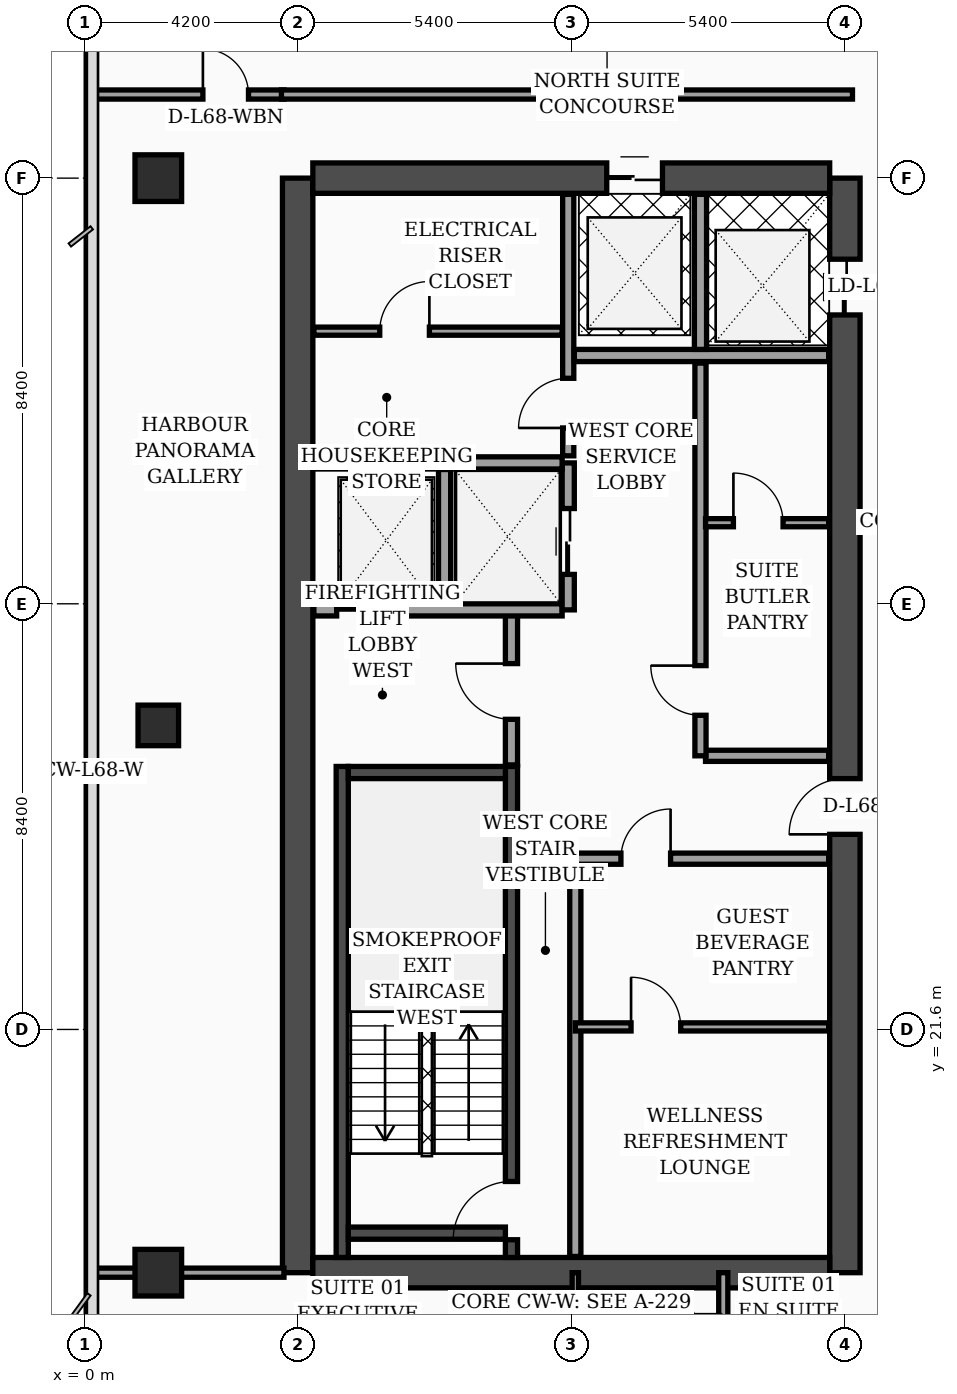
"""IFC4 building model, lengths in metres.
Left out: names, types, materials, properties, quantities, classifications, styles, units other than length and angle.
Written with IfcOpenShell. Run it as: python <this file> out.ifc"""

import sys

from ifc_helpers import new_model, si_unit, direction, frame, frame_2d, origin, origin_2d, place, context, subcontext, project, spatial, rectangle, extrude, element, fill, save


model = new_model("IFC4")
c1 = context("Model", 3, precision=1e-05, world=origin(), true_north=direction((0.0, 1.0)))
c2 = subcontext(c1, "Body", "Model", "MODEL_VIEW")
j1 = project(units=[si_unit("LENGTHUNIT", "METRE"), si_unit("PLANEANGLEUNIT", "RADIAN")], contexts=[c1])
p1 = place(None, origin())
s1 = spatial("IfcSite", under=j1, at=p1, CompositionType="ELEMENT")
p2 = place(p1, origin())
s2 = spatial("IfcBuilding", under=s1, at=p2, CompositionType="ELEMENT")
p3 = place(p2, frame((0.0, 0.0, 274.9)))
s3 = spatial("IfcBuildingStorey", under=s2, at=p3, CompositionType="ELEMENT", Elevation=274.9)
p4 = place(p3, frame((4.2, 16.8, 0.0), z_axis=(0.0, 0.0, 1.0), x_axis=(0.0, 1.0, 0.0)))
e1 = element("IfcWall", 1, at=p4, inside=s3, PredefinedType="SHEAR", context=c2, shape_type="SweptSolid", body=[
    extrude(rectangle(XDim=21.6, YDim=0.6, at=frame_2d((10.8, 0.0))), origin(), (0.0, 0.0, 1.0), 3.56),
])
p5 = place(p3, frame((15.0, 16.8, 0.0), z_axis=(0.0, 0.0, 1.0), x_axis=(0.0, 1.0, 0.0)))
e2 = element("IfcWall", 2, at=p5, inside=s3, PredefinedType="SHEAR", context=c2, shape_type="SweptSolid", body=[
    extrude(rectangle(XDim=21.6, YDim=0.6, at=frame_2d((10.8, 0.0))), origin(), (0.0, 0.0, 1.0), 3.56),
])
p6 = place(p5, frame((8.65, 0.0, 0.0)))
e3 = element("IfcOpeningElement", 3, at=p6, cuts=e2, PredefinedType="OPENING", context=c2, shape_type="SweptSolid", body=[
    extrude(rectangle(XDim=1.1, YDim=2.2, at=frame_2d((0.55, 1.1))), frame((0.0, 0.31, 0.0), z_axis=(0.0, -1.0, 0.0), x_axis=(1.0, 0.0, 0.0)), (0.0, 0.0, 1.0), 0.62),
])
p7 = place(p5, frame((18.9, 0.0, 0.0)))
e4 = element("IfcOpeningElement", 4, at=p7, cuts=e2, PredefinedType="OPENING", context=c2, shape_type="SweptSolid", body=[
    extrude(rectangle(XDim=1.1, YDim=2.2, at=frame_2d((0.55, 1.1))), frame((0.0, 0.31, 0.0), z_axis=(0.0, -1.0, 0.0), x_axis=(1.0, 0.0, 0.0)), (0.0, 0.0, 1.0), 0.62),
])
p8 = place(p3, frame((4.5, 38.4, 0.0), z_axis=(0.0, 0.0, 1.0), x_axis=(1.0, 0.0, 0.0)))
e5 = element("IfcWall", 5, at=p8, inside=s3, PredefinedType="SHEAR", context=c2, shape_type="SweptSolid", body=[
    extrude(rectangle(XDim=10.2, YDim=0.6, at=frame_2d((5.1, 0.0))), origin(), (0.0, 0.0, 1.0), 3.56),
])
p9 = place(p8, frame((5.8, 0.0, 0.0)))
e6 = element("IfcOpeningElement", 6, at=p9, cuts=e5, PredefinedType="OPENING", context=c2, shape_type="SweptSolid", body=[
    extrude(rectangle(XDim=1.1, YDim=2.2, at=frame_2d((0.55, 1.1))), frame((0.0, 0.31, 0.0), z_axis=(0.0, -1.0, 0.0), x_axis=(1.0, 0.0, 0.0)), (0.0, 0.0, 1.0), 0.62),
])
p10 = place(p3, frame((4.5, 16.8, 0.0), z_axis=(0.0, 0.0, 1.0), x_axis=(1.0, 0.0, 0.0)))
e7 = element("IfcWall", 7, at=p10, inside=s3, PredefinedType="SHEAR", context=c2, shape_type="SweptSolid", body=[
    extrude(rectangle(XDim=10.2, YDim=0.6, at=frame_2d((5.1, 0.0))), origin(), (0.0, 0.0, 1.0), 3.56),
])
p11 = place(p3, frame((5.08, 17.1, 0.0), z_axis=(0.0, 0.0, 1.0), x_axis=(0.0, 1.0, 0.0)))
e8 = element("IfcWall", 8, at=p11, inside=s3, PredefinedType="SOLIDWALL", context=c2, shape_type="SweptSolid", body=[
    extrude(rectangle(XDim=9.69, YDim=0.24, at=frame_2d((4.845, 0.0))), origin(), (0.0, 0.0, 1.0), 3.56),
])
p12 = place(p3, frame((8.42, 17.1, 0.0), z_axis=(0.0, 0.0, 1.0), x_axis=(0.0, 1.0, 0.0)))
e9 = element("IfcWall", 9, at=p12, inside=s3, PredefinedType="SOLIDWALL", context=c2, shape_type="SweptSolid", body=[
    extrude(rectangle(XDim=9.69, YDim=0.24, at=frame_2d((4.845, 0.0))), origin(), (0.0, 0.0, 1.0), 3.56),
])
p13 = place(p12, frame((0.35, 0.0, 0.0)))
e10 = element("IfcOpeningElement", 10, at=p13, cuts=e9, PredefinedType="OPENING", context=c2, shape_type="SweptSolid", body=[
    extrude(rectangle(XDim=1.15, YDim=2.2, at=frame_2d((0.575, 1.1))), frame((0.0, 0.13, 0.0), z_axis=(0.0, -1.0, 0.0), x_axis=(1.0, 0.0, 0.0)), (0.0, 0.0, 1.0), 0.26),
])
for number, where, z_axis, x_axis in (
    (11, (5.2, 17.58, 0.0), (0.0, 0.0, 1.0), (1.0, 0.0, 0.0)),
    (12, (5.2, 26.67, 0.0), (0.0, 0.0, 1.0), (1.0, 0.0, 0.0)),
):
    element("IfcWall", number, at=place(p3, frame(where, z_axis=z_axis, x_axis=x_axis)), inside=s3, PredefinedType="SOLIDWALL", context=c2, shape_type="SweptSolid", body=[
        extrude(rectangle(XDim=3.1, YDim=0.24, at=frame_2d((1.55, 0.0))), origin(), (0.0, 0.0, 1.0), 3.56),
    ])
p14 = place(p3, frame((1.45, 16.8, 0.0), z_axis=(0.0, 0.0, 1.0), x_axis=(1.0, 0.0, 0.0)))
e13 = element("IfcColumn", 13, at=p14, inside=s3, PredefinedType="COLUMN", context=c2, shape_type="SweptSolid", body=[
    extrude(rectangle(XDim=0.92, YDim=0.92, at=origin_2d()), origin(), (0.0, 0.0, 1.0), 3.56),
])
p15 = place(p3, frame((1.45, 27.6, 0.0), z_axis=(0.0, 0.0, 1.0), x_axis=(1.0, 0.0, 0.0)))
e14 = element("IfcColumn", 14, at=p15, inside=s3, PredefinedType="COLUMN", context=c2, shape_type="SweptSolid", body=[
    extrude(rectangle(XDim=0.8, YDim=0.8, at=origin_2d()), origin(), (0.0, 0.0, 1.0), 3.56),
])
p16 = place(p3, frame((1.45, 38.4, 0.0), z_axis=(0.0, 0.0, 1.0), x_axis=(1.0, 0.0, 0.0)))
e15 = element("IfcColumn", 15, at=p16, inside=s3, PredefinedType="COLUMN", context=c2, shape_type="SweptSolid", body=[
    extrude(rectangle(XDim=0.92, YDim=0.92, at=origin_2d()), origin(), (0.0, 0.0, 1.0), 3.56),
])
p17 = place(p3, frame((8.42, 26.82, 0.0), z_axis=(0.0, 0.0, 1.0), x_axis=(0.0, 1.0, 0.0)))
e16 = element("IfcWall", 16, at=p17, inside=s3, PredefinedType="SOLIDWALL", context=c2, shape_type="SweptSolid", body=[
    extrude(rectangle(XDim=3.0, YDim=0.24, at=frame_2d((1.5, 0.0))), origin(), (0.0, 0.0, 1.0), 3.56),
])
p18 = place(p17, frame((0.9, 0.0, 0.0)))
e17 = element("IfcOpeningElement", 17, at=p18, cuts=e16, PredefinedType="OPENING", context=c2, shape_type="SweptSolid", body=[
    extrude(rectangle(XDim=1.1, YDim=2.2, at=frame_2d((0.55, 1.1))), frame((0.0, 0.13, 0.0), z_axis=(0.0, -1.0, 0.0), x_axis=(1.0, 0.0, 0.0)), (0.0, 0.0, 1.0), 0.26),
])
p19 = place(p3, frame((4.52, 29.88, 0.0), z_axis=(0.0, 0.0, 1.0), x_axis=(1.0, 0.0, 0.0)))
e18 = element("IfcWall", 18, at=p19, inside=s3, PredefinedType="SOLIDWALL", context=c2, shape_type="SweptSolid", body=[
    extrude(rectangle(XDim=4.9, YDim=0.24, at=frame_2d((2.45, 0.0))), origin(), (0.0, 0.0, 1.0), 3.56),
])
p20 = place(p19, frame((0.45, 0.0, 0.0)))
e19 = element("IfcOpeningElement", 19, at=p20, cuts=e18, PredefinedType="OPENING", context=c2, shape_type="SweptSolid", body=[
    extrude(rectangle(XDim=1.3, YDim=2.35, at=frame_2d((0.65, 1.175))), frame((0.0, 0.13, 0.0), z_axis=(0.0, -1.0, 0.0), x_axis=(1.0, 0.0, 0.0)), (0.0, 0.0, 1.0), 0.26),
])
p21 = place(p3, frame((7.1, 30.02, 0.0), z_axis=(0.0, 0.0, 1.0), x_axis=(0.0, 1.0, 0.0)))
e20 = element("IfcWall", 20, at=p21, inside=s3, PredefinedType="SOLIDWALL", context=c2, shape_type="SweptSolid", body=[
    extrude(rectangle(XDim=2.63, YDim=0.24, at=frame_2d((1.315, 0.0))), origin(), (0.0, 0.0, 1.0), 3.56),
])
p22 = place(p3, frame((9.54, 29.88, 0.0), z_axis=(0.0, 0.0, 1.0), x_axis=(0.0, 1.0, 0.0)))
e21 = element("IfcWall", 21, at=p22, inside=s3, PredefinedType="SOLIDWALL", context=c2, shape_type="SweptSolid", body=[
    extrude(rectangle(XDim=2.9, YDim=0.24, at=frame_2d((1.45, 0.0))), origin(), (0.0, 0.0, 1.0), 3.56),
])
p23 = place(p22, frame((0.7, 0.0, 0.0)))
e22 = element("IfcOpeningElement", 22, at=p23, cuts=e21, PredefinedType="OPENING", context=c2, shape_type="SweptSolid", body=[
    extrude(rectangle(XDim=1.3, YDim=2.35, at=frame_2d((0.65, 1.175))), frame((0.0, 0.13, 0.0), z_axis=(0.0, -1.0, 0.0), x_axis=(1.0, 0.0, 0.0)), (0.0, 0.0, 1.0), 0.26),
])
p24 = place(p3, frame((4.52, 32.78, 0.0), z_axis=(0.0, 0.0, 1.0), x_axis=(1.0, 0.0, 0.0)))
e23 = element("IfcWall", 23, at=p24, inside=s3, PredefinedType="SOLIDWALL", context=c2, shape_type="SweptSolid", body=[
    extrude(rectangle(XDim=4.9, YDim=0.24, at=frame_2d((2.45, 0.0))), origin(), (0.0, 0.0, 1.0), 3.19),
])
p25 = place(p3, frame((9.68, 17.12, 0.0), z_axis=(0.0, 0.0, 1.0), x_axis=(0.0, 1.0, 0.0)))
e24 = element("IfcWall", 24, at=p25, inside=s3, PredefinedType="SOLIDWALL", context=c2, shape_type="SweptSolid", body=[
    extrude(rectangle(XDim=7.88, YDim=0.22, at=frame_2d((3.94, 0.0))), origin(), (0.0, 0.0, 1.0), 3.56),
])
p26 = place(p3, frame((4.52, 35.38, 0.0), z_axis=(0.0, 0.0, 1.0), x_axis=(1.0, 0.0, 0.0)))
e25 = element("IfcWall", 25, at=p26, inside=s3, PredefinedType="PARTITIONING", context=c2, shape_type="SweptSolid", body=[
    extrude(rectangle(XDim=4.9, YDim=0.16, at=frame_2d((2.45, 0.0))), origin(), (0.0, 0.0, 1.0), 3.56),
])
p27 = place(p26, frame((1.3, 0.0, 0.0)))
e26 = element("IfcOpeningElement", 26, at=p27, cuts=e25, PredefinedType="OPENING", context=c2, shape_type="SweptSolid", body=[
    extrude(rectangle(XDim=0.98, YDim=2.15, at=frame_2d((0.49, 1.075))), frame((0.0, 0.09, 0.0), z_axis=(0.0, -1.0, 0.0), x_axis=(1.0, 0.0, 0.0)), (0.0, 0.0, 1.0), 0.18),
])
p28 = place(p3, frame((9.54, 32.92, 0.0), z_axis=(0.0, 0.0, 1.0), x_axis=(0.0, 1.0, 0.0)))
e27 = element("IfcWall", 27, at=p28, inside=s3, PredefinedType="SOLIDWALL", context=c2, shape_type="SweptSolid", body=[
    extrude(rectangle(XDim=5.16, YDim=0.22, at=frame_2d((2.58, 0.0))), origin(), (0.0, 0.0, 1.0), 3.56),
])
p29 = place(p28, frame((0.55, 0.0, 0.0)))
e28 = element("IfcOpeningElement", 28, at=p29, cuts=e27, PredefinedType="OPENING", context=c2, shape_type="SweptSolid", body=[
    extrude(rectangle(XDim=0.98, YDim=2.15, at=frame_2d((0.49, 1.075))), frame((0.0, 0.12, 0.0), z_axis=(0.0, -1.0, 0.0), x_axis=(1.0, 0.0, 0.0)), (0.0, 0.0, 1.0), 0.24),
])
p30 = place(p3, frame((9.68, 21.65, 0.0), z_axis=(0.0, 0.0, 1.0), x_axis=(1.0, 0.0, 0.0)))
e29 = element("IfcWall", 29, at=p30, inside=s3, PredefinedType="PARTITIONING", context=c2, shape_type="SweptSolid", body=[
    extrude(rectangle(XDim=5.0, YDim=0.16, at=frame_2d((2.5, 0.0))), origin(), (0.0, 0.0, 1.0), 3.09),
])
p31 = place(p30, frame((1.1, 0.0, 0.0)))
e30 = element("IfcOpeningElement", 30, at=p31, cuts=e29, PredefinedType="OPENING", context=c2, shape_type="SweptSolid", body=[
    extrude(rectangle(XDim=0.98, YDim=2.15, at=frame_2d((0.49, 1.075))), frame((0.0, 0.09, 0.0), z_axis=(0.0, -1.0, 0.0), x_axis=(1.0, 0.0, 0.0)), (0.0, 0.0, 1.0), 0.18),
])
p32 = place(p3, frame((9.68, 24.97, 0.0), z_axis=(0.0, 0.0, 1.0), x_axis=(1.0, 0.0, 0.0)))
e31 = element("IfcWall", 31, at=p32, inside=s3, PredefinedType="SOLIDWALL", context=c2, shape_type="SweptSolid", body=[
    extrude(rectangle(XDim=5.0, YDim=0.22, at=frame_2d((2.5, 0.0))), origin(), (0.0, 0.0, 1.0), 2.99),
])
p33 = place(p32, frame((0.9, 0.0, 0.0)))
e32 = element("IfcOpeningElement", 32, at=p33, cuts=e31, PredefinedType="OPENING", context=c2, shape_type="SweptSolid", body=[
    extrude(rectangle(XDim=0.98, YDim=2.15, at=frame_2d((0.49, 1.075))), frame((0.0, 0.12, 0.0), z_axis=(0.0, -1.0, 0.0), x_axis=(1.0, 0.0, 0.0)), (0.0, 0.0, 1.0), 0.24),
])
p34 = place(p3, frame((12.25, 27.0, 0.0), z_axis=(0.0, 0.0, 1.0), x_axis=(1.0, 0.0, 0.0)))
e33 = element("IfcWall", 33, at=p34, inside=s3, PredefinedType="SOLIDWALL", context=c2, shape_type="SweptSolid", body=[
    extrude(rectangle(XDim=2.43, YDim=0.22, at=frame_2d((1.215, 0.0))), origin(), (0.0, 0.0, 1.0), 3.56),
])
p35 = place(p3, frame((12.15, 27.0, 0.0), z_axis=(0.0, 0.0, 1.0), x_axis=(0.0, 1.0, 0.0)))
e34 = element("IfcWall", 34, at=p35, inside=s3, PredefinedType="SOLIDWALL", context=c2, shape_type="SweptSolid", body=[
    extrude(rectangle(XDim=7.75, YDim=0.22, at=frame_2d((3.875, 0.0))), origin(), (0.0, 0.0, 1.0), 3.56),
])
p36 = place(p35, frame((0.8, 0.0, 0.0)))
e35 = element("IfcOpeningElement", 35, at=p36, cuts=e34, PredefinedType="OPENING", context=c2, shape_type="SweptSolid", body=[
    extrude(rectangle(XDim=0.98, YDim=2.15, at=frame_2d((0.49, 1.075))), frame((0.0, 0.12, 0.0), z_axis=(0.0, -1.0, 0.0), x_axis=(1.0, 0.0, 0.0)), (0.0, 0.0, 1.0), 0.24),
])
p37 = place(p3, frame((12.25, 31.6, 0.0), z_axis=(0.0, 0.0, 1.0), x_axis=(1.0, 0.0, 0.0)))
e36 = element("IfcWall", 36, at=p37, inside=s3, PredefinedType="PARTITIONING", context=c2, shape_type="SweptSolid", body=[
    extrude(rectangle(XDim=2.43, YDim=0.16, at=frame_2d((1.215, 0.0))), origin(), (0.0, 0.0, 1.0), 3.14),
])
p38 = place(p37, frame((0.55, 0.0, 0.0)))
e37 = element("IfcOpeningElement", 37, at=p38, cuts=e36, PredefinedType="OPENING", context=c2, shape_type="SweptSolid", body=[
    extrude(rectangle(XDim=0.98, YDim=2.15, at=frame_2d((0.49, 1.075))), frame((0.0, 0.09, 0.0), z_axis=(0.0, -1.0, 0.0), x_axis=(1.0, 0.0, 0.0)), (0.0, 0.0, 1.0), 0.18),
])
p39 = place(p3, frame((9.66, 34.9, 0.0), z_axis=(0.0, 0.0, 1.0), x_axis=(1.0, 0.0, 0.0)))
e38 = element("IfcWall", 38, at=p39, inside=s3, PredefinedType="SOLIDWALL", context=c2, shape_type="SweptSolid", body=[
    extrude(rectangle(XDim=5.02, YDim=0.24, at=frame_2d((2.51, 0.0))), origin(), (0.0, 0.0, 1.0), 3.56),
])
p40 = place(p3, frame((12.15, 35.02, 0.0), z_axis=(0.0, 0.0, 1.0), x_axis=(0.0, 1.0, 0.0)))
e39 = element("IfcWall", 39, at=p40, inside=s3, PredefinedType="SOLIDWALL", context=c2, shape_type="SweptSolid", body=[
    extrude(rectangle(XDim=3.06, YDim=0.24, at=frame_2d((1.53, 0.0))), origin(), (0.0, 0.0, 1.0), 3.56),
])
p41 = place(p3, frame((0.08, 16.8, 0.0), z_axis=(0.0, 0.0, 1.0), x_axis=(1.0, 0.0, 0.0)))
e40 = element("IfcWall", 40, at=p41, inside=s3, PredefinedType="PARTITIONING", context=c2, shape_type="SweptSolid", body=[
    extrude(rectangle(XDim=3.85, YDim=0.18, at=frame_2d((1.925, 0.0))), origin(), (0.0, 0.0, 1.0), 2.99),
])
p42 = place(p3, frame((0.08, 40.05, 0.0), z_axis=(0.0, 0.0, 1.0), x_axis=(1.0, 0.0, 0.0)))
e41 = element("IfcWall", 41, at=p42, inside=s3, PredefinedType="PARTITIONING", context=c2, shape_type="SweptSolid", body=[
    extrude(rectangle(XDim=3.85, YDim=0.18, at=frame_2d((1.925, 0.0))), origin(), (0.0, 0.0, 1.0), 2.99),
])
p43 = place(p42, frame((2.25, 0.0, 0.0)))
e42 = element("IfcOpeningElement", 42, at=p43, cuts=e41, PredefinedType="OPENING", context=c2, shape_type="SweptSolid", body=[
    extrude(rectangle(XDim=0.9, YDim=2.15, at=frame_2d((0.45, 1.075))), frame((0.0, 0.1, 0.0), z_axis=(0.0, -1.0, 0.0), x_axis=(1.0, 0.0, 0.0)), (0.0, 0.0, 1.0), 0.2),
])
p44 = place(p3, frame((9.68, 14.55, 0.0), z_axis=(0.0, 0.0, 1.0), x_axis=(0.0, 1.0, 0.0)))
e43 = element("IfcWall", 43, at=p44, inside=s3, PredefinedType="PARTITIONING", context=c2, shape_type="SweptSolid", body=[
    extrude(rectangle(XDim=2.25, YDim=0.125, at=frame_2d((1.125, 0.0))), origin(), (0.0, 0.0, 1.0), 3.56),
])
p45 = place(p3, frame((12.6, 2.44, 0.0), z_axis=(0.0, 0.0, 1.0), x_axis=(0.0, 1.0, 0.0)))
e44 = element("IfcWall", 44, at=p45, inside=s3, PredefinedType="PARTITIONING", context=c2, shape_type="SweptSolid", body=[
    extrude(rectangle(XDim=14.36, YDim=0.18, at=frame_2d((7.18, 0.0))), origin(), (0.0, 0.0, 1.0), 2.99),
])
p46 = place(p45, frame((3.01, 0.0, 0.0)))
e45 = element("IfcOpeningElement", 45, at=p46, cuts=e44, PredefinedType="OPENING", context=c2, shape_type="SweptSolid", body=[
    extrude(rectangle(XDim=1.02, YDim=2.2, at=frame_2d((0.51, 1.1))), frame((0.0, 0.1, 0.0), z_axis=(0.0, -1.0, 0.0), x_axis=(1.0, 0.0, 0.0)), (0.0, 0.0, 1.0), 0.2),
])
p47 = place(p3, frame((3.88, 40.05, 0.0), z_axis=(0.0, 0.0, 1.0), x_axis=(1.0, 0.0, 0.0)))
e46 = element("IfcWall", 46, at=p47, inside=s3, PredefinedType="PARTITIONING", context=c2, shape_type="SweptSolid", body=[
    extrude(rectangle(XDim=11.27, YDim=0.18, at=frame_2d((5.635, 0.0))), origin(), (0.0, 0.0, 1.0), 2.99),
])
p48 = place(p18, origin())
e47 = element("IfcDoor", 47, at=p48, inside=s3, OperationType="SINGLE_SWING_RIGHT", PredefinedType="DOOR", context=c2, shape_type="SweptSolid", body=[
    extrude(rectangle(XDim=1.1, YDim=2.2, at=frame_2d((0.55, 1.1))), frame((0.0, 0.025, 0.0), z_axis=(0.0, -1.0, 0.0), x_axis=(1.0, 0.0, 0.0)), (0.0, 0.0, 1.0), 0.05),
])
fill(e17, e47)
p49 = place(p20, origin())
e48 = element("IfcDoor", 48, at=p49, inside=s3, OperationType="DOUBLE_DOOR_SLIDING", PredefinedType="DOOR", context=c2, shape_type="SweptSolid", body=[
    extrude(rectangle(XDim=1.3, YDim=2.35, at=frame_2d((0.65, 1.175))), frame((0.0, 0.025, 0.0), z_axis=(0.0, -1.0, 0.0), x_axis=(1.0, 0.0, 0.0)), (0.0, 0.0, 1.0), 0.05),
])
fill(e19, e48)
p50 = place(p23, origin())
e49 = element("IfcDoor", 49, at=p50, inside=s3, OperationType="DOUBLE_DOOR_SLIDING", PredefinedType="DOOR", context=c2, shape_type="SweptSolid", body=[
    extrude(rectangle(XDim=1.3, YDim=2.35, at=frame_2d((0.65, 1.175))), frame((0.0, 0.025, 0.0), z_axis=(0.0, -1.0, 0.0), x_axis=(1.0, 0.0, 0.0)), (0.0, 0.0, 1.0), 0.05),
])
fill(e22, e49)
p51 = place(p27, origin())
e50 = element("IfcDoor", 50, at=p51, inside=s3, OperationType="SINGLE_SWING_RIGHT", PredefinedType="DOOR", context=c2, shape_type="SweptSolid", body=[
    extrude(rectangle(XDim=0.98, YDim=2.15, at=frame_2d((0.49, 1.075))), frame((0.0, 0.025, 0.0), z_axis=(0.0, -1.0, 0.0), x_axis=(1.0, 0.0, 0.0)), (0.0, 0.0, 1.0), 0.05),
])
fill(e26, e50)
p52 = place(p29, origin())
e51 = element("IfcDoor", 51, at=p52, inside=s3, OperationType="SINGLE_SWING_LEFT", PredefinedType="DOOR", context=c2, shape_type="SweptSolid", body=[
    extrude(rectangle(XDim=0.98, YDim=2.15, at=frame_2d((0.49, 1.075))), frame((0.0, 0.025, 0.0), z_axis=(0.0, -1.0, 0.0), x_axis=(1.0, 0.0, 0.0)), (0.0, 0.0, 1.0), 0.05),
])
fill(e28, e51)
p53 = place(p31, origin())
e52 = element("IfcDoor", 52, at=p53, inside=s3, OperationType="SINGLE_SWING_LEFT", PredefinedType="DOOR", context=c2, shape_type="SweptSolid", body=[
    extrude(rectangle(XDim=0.98, YDim=2.15, at=frame_2d((0.49, 1.075))), frame((0.0, 0.025, 0.0), z_axis=(0.0, -1.0, 0.0), x_axis=(1.0, 0.0, 0.0)), (0.0, 0.0, 1.0), 0.05),
])
fill(e30, e52)
p54 = place(p33, origin())
e53 = element("IfcDoor", 53, at=p54, inside=s3, OperationType="SINGLE_SWING_RIGHT", PredefinedType="DOOR", context=c2, shape_type="SweptSolid", body=[
    extrude(rectangle(XDim=0.98, YDim=2.15, at=frame_2d((0.49, 1.075))), frame((0.0, 0.025, 0.0), z_axis=(0.0, -1.0, 0.0), x_axis=(1.0, 0.0, 0.0)), (0.0, 0.0, 1.0), 0.05),
])
fill(e32, e53)
p55 = place(p36, origin())
e54 = element("IfcDoor", 54, at=p55, inside=s3, OperationType="SINGLE_SWING_RIGHT", PredefinedType="DOOR", context=c2, shape_type="SweptSolid", body=[
    extrude(rectangle(XDim=0.98, YDim=2.15, at=frame_2d((0.49, 1.075))), frame((0.0, 0.025, 0.0), z_axis=(0.0, -1.0, 0.0), x_axis=(1.0, 0.0, 0.0)), (0.0, 0.0, 1.0), 0.05),
])
fill(e35, e54)
p56 = place(p38, origin())
e55 = element("IfcDoor", 55, at=p56, inside=s3, OperationType="SINGLE_SWING_LEFT", PredefinedType="DOOR", context=c2, shape_type="SweptSolid", body=[
    extrude(rectangle(XDim=0.98, YDim=2.15, at=frame_2d((0.49, 1.075))), frame((0.0, 0.025, 0.0), z_axis=(0.0, -1.0, 0.0), x_axis=(1.0, 0.0, 0.0)), (0.0, 0.0, 1.0), 0.05),
])
fill(e37, e55)
p57 = place(p43, origin())
e56 = element("IfcDoor", 56, at=p57, inside=s3, OperationType="SINGLE_SWING_LEFT", PredefinedType="DOOR", context=c2, shape_type="SweptSolid", body=[
    extrude(rectangle(XDim=0.9, YDim=2.15, at=frame_2d((0.45, 1.075))), frame((0.0, 0.025, 0.0), z_axis=(0.0, -1.0, 0.0), x_axis=(1.0, 0.0, 0.0)), (0.0, 0.0, 1.0), 0.05),
])
fill(e42, e56)
p58 = place(p13, origin())
e57 = element("IfcDoor", 57, at=p58, inside=s3, OperationType="SINGLE_SWING_LEFT", PredefinedType="DOOR", context=c2, shape_type="SweptSolid", body=[
    extrude(rectangle(XDim=1.15, YDim=2.2, at=frame_2d((0.575, 1.1))), frame((0.0, 0.025, 0.0), z_axis=(0.0, -1.0, 0.0), x_axis=(1.0, 0.0, 0.0)), (0.0, 0.0, 1.0), 0.05),
])
fill(e10, e57)
p59 = place(p6, origin())
e58 = element("IfcDoor", 58, at=p59, inside=s3, OperationType="SINGLE_SWING_LEFT", PredefinedType="DOOR", context=c2, shape_type="SweptSolid", body=[
    extrude(rectangle(XDim=1.1, YDim=2.2, at=frame_2d((0.55, 1.1))), frame((0.0, 0.025, 0.0), z_axis=(0.0, -1.0, 0.0), x_axis=(1.0, 0.0, 0.0)), (0.0, 0.0, 1.0), 0.05),
])
fill(e3, e58)
p60 = place(p7, origin())
e59 = element("IfcDoor", 59, at=p60, inside=s3, OperationType="DOUBLE_DOOR_SLIDING", PredefinedType="DOOR", context=c2, shape_type="SweptSolid", body=[
    extrude(rectangle(XDim=1.1, YDim=2.2, at=frame_2d((0.55, 1.1))), frame((0.0, 0.025, 0.0), z_axis=(0.0, -1.0, 0.0), x_axis=(1.0, 0.0, 0.0)), (0.0, 0.0, 1.0), 0.05),
])
fill(e4, e59)
p61 = place(p9, origin())
e60 = element("IfcDoor", 60, at=p61, inside=s3, OperationType="DOUBLE_DOOR_SLIDING", PredefinedType="DOOR", context=c2, shape_type="SweptSolid", body=[
    extrude(rectangle(XDim=1.1, YDim=2.2, at=frame_2d((0.55, 1.1))), frame((0.0, 0.025, 0.0), z_axis=(0.0, -1.0, 0.0), x_axis=(1.0, 0.0, 0.0)), (0.0, 0.0, 1.0), 0.05),
])
fill(e6, e60)
save(model, sys.argv[1])
